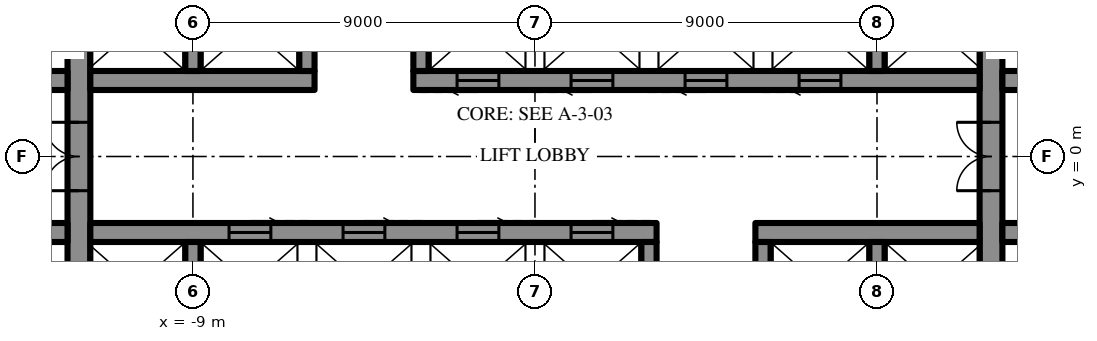
"""IFC4 building model, lengths in metres.
Left out: names, types, materials, properties, quantities, classifications, styles, units other than length and angle.
Written with IfcOpenShell. Run it as: python <this file> out.ifc"""

import sys

from ifc_helpers import new_model, si_unit, direction, frame, frame_2d, origin, place, context, subcontext, project, spatial, rectangle, extrude, element, fill, save


model = new_model("IFC4")
c1 = context("Model", 3, precision=1e-05, world=origin(), true_north=direction((0.0, 1.0)))
c2 = subcontext(c1, "Body", "Model", "MODEL_VIEW")
j1 = project(units=[si_unit("LENGTHUNIT", "METRE"), si_unit("PLANEANGLEUNIT", "RADIAN")], contexts=[c1])
p1 = place(None, origin())
s1 = spatial("IfcSite", under=j1, at=p1, CompositionType="ELEMENT")
p2 = place(p1, origin())
s2 = spatial("IfcBuilding", under=s1, at=p2, CompositionType="ELEMENT")
p3 = place(p2, frame((0.0, 0.0, 270.1)))
s3 = spatial("IfcBuildingStorey", under=s2, at=p3, CompositionType="ELEMENT", Elevation=270.1)
p4 = place(p3, frame((12.0, -10.7, 0.0), z_axis=(0.0, 0.0, 1.0), x_axis=(0.0, 1.0, 0.0)))
e1 = element("IfcWall", 1, at=p4, inside=s3, PredefinedType="SHEAR", context=c2, shape_type="SweptSolid", body=[
    extrude(rectangle(XDim=21.4, YDim=0.6, at=frame_2d((10.7, 0.0))), origin(), (0.0, 0.0, 1.0), 4.2),
])
p5 = place(p4, frame((9.8, 0.0, 0.0)))
e2 = element("IfcOpeningElement", 2, at=p5, cuts=e1, PredefinedType="OPENING", context=c2, shape_type="SweptSolid", body=[
    extrude(rectangle(XDim=1.8, YDim=2.4, at=frame_2d((0.9, 1.2))), frame((0.0, 0.31, 0.0), z_axis=(0.0, -1.0, 0.0), x_axis=(1.0, 0.0, 0.0)), (0.0, 0.0, 1.0), 0.62),
])
p6 = place(p3, frame((-12.0, -10.7, 0.0), z_axis=(0.0, 0.0, 1.0), x_axis=(0.0, 1.0, 0.0)))
e3 = element("IfcWall", 3, at=p6, inside=s3, PredefinedType="SHEAR", context=c2, shape_type="SweptSolid", body=[
    extrude(rectangle(XDim=21.4, YDim=0.6, at=frame_2d((10.7, 0.0))), origin(), (0.0, 0.0, 1.0), 4.2),
])
p7 = place(p6, frame((9.8, 0.0, 0.0)))
e4 = element("IfcOpeningElement", 4, at=p7, cuts=e3, PredefinedType="OPENING", context=c2, shape_type="SweptSolid", body=[
    extrude(rectangle(XDim=1.8, YDim=2.4, at=frame_2d((0.9, 1.2))), frame((0.0, 0.31, 0.0), z_axis=(0.0, -1.0, 0.0), x_axis=(1.0, 0.0, 0.0)), (0.0, 0.0, 1.0), 0.62),
])
p8 = place(p3, frame((-14.5, 2.0, 0.0), z_axis=(0.0, 0.0, 1.0), x_axis=(1.0, 0.0, 0.0)))
e5 = element("IfcWall", 5, at=p8, inside=s3, PredefinedType="SHEAR", context=c2, shape_type="SweptSolid", body=[
    extrude(rectangle(XDim=2.2, YDim=0.5, at=frame_2d((1.1, 0.0))), origin(), (0.0, 0.0, 1.0), 4.2),
])
p9 = place(p8, frame((0.5, 0.0, 0.0)))
e6 = element("IfcOpeningElement", 6, at=p9, cuts=e5, PredefinedType="OPENING", context=c2, shape_type="SweptSolid", body=[
    extrude(rectangle(XDim=0.9, YDim=2.2, at=frame_2d((0.45, 1.1))), frame((0.0, 0.26, 0.0), z_axis=(0.0, -1.0, 0.0), x_axis=(1.0, 0.0, 0.0)), (0.0, 0.0, 1.0), 0.52),
])
p10 = place(p3, frame((-11.7, 2.0, 0.0), z_axis=(0.0, 0.0, 1.0), x_axis=(1.0, 0.0, 0.0)))
e7 = element("IfcWall", 7, at=p10, inside=s3, PredefinedType="SHEAR", context=c2, shape_type="SweptSolid", body=[
    extrude(rectangle(XDim=5.9, YDim=0.5, at=frame_2d((2.95, 0.0))), origin(), (0.0, 0.0, 1.0), 4.2),
])
p11 = place(p3, frame((-3.2, 2.0, 0.0), z_axis=(0.0, 0.0, 1.0), x_axis=(1.0, 0.0, 0.0)))
e8 = element("IfcWall", 8, at=p11, inside=s3, PredefinedType="SHEAR", context=c2, shape_type="SweptSolid", body=[
    extrude(rectangle(XDim=14.9, YDim=0.5, at=frame_2d((7.45, 0.0))), origin(), (0.0, 0.0, 1.0), 4.2),
])
p12 = place(p11, frame((1.15, 0.0, 0.0)))
e9 = element("IfcOpeningElement", 9, at=p12, cuts=e8, PredefinedType="OPENING", context=c2, shape_type="SweptSolid", body=[
    extrude(rectangle(XDim=1.1, YDim=2.2, at=frame_2d((0.55, 1.1))), frame((0.0, 0.26, 0.0), z_axis=(0.0, -1.0, 0.0), x_axis=(1.0, 0.0, 0.0)), (0.0, 0.0, 1.0), 0.52),
])
p13 = place(p11, frame((4.15, 0.0, 0.0)))
e10 = element("IfcOpeningElement", 10, at=p13, cuts=e8, PredefinedType="OPENING", context=c2, shape_type="SweptSolid", body=[
    extrude(rectangle(XDim=1.1, YDim=2.2, at=frame_2d((0.55, 1.1))), frame((0.0, 0.26, 0.0), z_axis=(0.0, -1.0, 0.0), x_axis=(1.0, 0.0, 0.0)), (0.0, 0.0, 1.0), 0.52),
])
p14 = place(p11, frame((7.15, 0.0, 0.0)))
e11 = element("IfcOpeningElement", 11, at=p14, cuts=e8, PredefinedType="OPENING", context=c2, shape_type="SweptSolid", body=[
    extrude(rectangle(XDim=1.1, YDim=2.2, at=frame_2d((0.55, 1.1))), frame((0.0, 0.26, 0.0), z_axis=(0.0, -1.0, 0.0), x_axis=(1.0, 0.0, 0.0)), (0.0, 0.0, 1.0), 0.52),
])
p15 = place(p11, frame((10.15, 0.0, 0.0)))
e12 = element("IfcOpeningElement", 12, at=p15, cuts=e8, PredefinedType="OPENING", context=c2, shape_type="SweptSolid", body=[
    extrude(rectangle(XDim=1.1, YDim=2.2, at=frame_2d((0.55, 1.1))), frame((0.0, 0.26, 0.0), z_axis=(0.0, -1.0, 0.0), x_axis=(1.0, 0.0, 0.0)), (0.0, 0.0, 1.0), 0.52),
])
p16 = place(p3, frame((12.3, 2.0, 0.0), z_axis=(0.0, 0.0, 1.0), x_axis=(1.0, 0.0, 0.0)))
e13 = element("IfcWall", 13, at=p16, inside=s3, PredefinedType="SHEAR", context=c2, shape_type="SweptSolid", body=[
    extrude(rectangle(XDim=2.2, YDim=0.5, at=frame_2d((1.1, 0.0))), origin(), (0.0, 0.0, 1.0), 4.2),
])
p17 = place(p16, frame((0.8, 0.0, 0.0)))
e14 = element("IfcOpeningElement", 14, at=p17, cuts=e13, PredefinedType="OPENING", context=c2, shape_type="SweptSolid", body=[
    extrude(rectangle(XDim=0.9, YDim=2.2, at=frame_2d((0.45, 1.1))), frame((0.0, 0.26, 0.0), z_axis=(0.0, -1.0, 0.0), x_axis=(1.0, 0.0, 0.0)), (0.0, 0.0, 1.0), 0.52),
])
for number, where, z_axis, x_axis in (
    (15, (-9.0, 2.25, 0.0), (0.0, 0.0, 1.0), (0.0, 1.0, 0.0)),
    (16, (-6.0, 2.25, 0.0), (0.0, 0.0, 1.0), (0.0, 1.0, 0.0)),
    (17, (-3.0, 2.25, 0.0), (0.0, 0.0, 1.0), (0.0, 1.0, 0.0)),
    (18, (9.0, 2.25, 0.0), (0.0, 0.0, 1.0), (0.0, 1.0, 0.0)),
):
    element("IfcWall", number, at=place(p3, frame(where, z_axis=z_axis, x_axis=x_axis)), inside=s3, PredefinedType="SHEAR", context=c2, shape_type="SweptSolid", body=[
        extrude(rectangle(XDim=2.3, YDim=0.4, at=frame_2d((1.15, 0.0))), origin(), (0.0, 0.0, 1.0), 4.2),
    ])
p18 = place(p3, frame((14.5, -2.0, 0.0), z_axis=(0.0, 0.0, 1.0), x_axis=(-1.0, 0.0, 0.0)))
e19 = element("IfcWall", 19, at=p18, inside=s3, PredefinedType="SHEAR", context=c2, shape_type="SweptSolid", body=[
    extrude(rectangle(XDim=2.2, YDim=0.5, at=frame_2d((1.1, 0.0))), origin(), (0.0, 0.0, 1.0), 4.2),
])
p19 = place(p18, frame((0.5, 0.0, 0.0)))
e20 = element("IfcOpeningElement", 20, at=p19, cuts=e19, PredefinedType="OPENING", context=c2, shape_type="SweptSolid", body=[
    extrude(rectangle(XDim=0.9, YDim=2.2, at=frame_2d((0.45, 1.1))), frame((0.0, 0.26, 0.0), z_axis=(0.0, -1.0, 0.0), x_axis=(1.0, 0.0, 0.0)), (0.0, 0.0, 1.0), 0.52),
])
p20 = place(p3, frame((11.7, -2.0, 0.0), z_axis=(0.0, 0.0, 1.0), x_axis=(-1.0, 0.0, 0.0)))
e21 = element("IfcWall", 21, at=p20, inside=s3, PredefinedType="SHEAR", context=c2, shape_type="SweptSolid", body=[
    extrude(rectangle(XDim=5.9, YDim=0.5, at=frame_2d((2.95, 0.0))), origin(), (0.0, 0.0, 1.0), 4.2),
])
p21 = place(p3, frame((3.2, -2.0, 0.0), z_axis=(0.0, 0.0, 1.0), x_axis=(-1.0, 0.0, 0.0)))
e22 = element("IfcWall", 22, at=p21, inside=s3, PredefinedType="SHEAR", context=c2, shape_type="SweptSolid", body=[
    extrude(rectangle(XDim=14.9, YDim=0.5, at=frame_2d((7.45, 0.0))), origin(), (0.0, 0.0, 1.0), 4.2),
])
p22 = place(p21, frame((1.15, 0.0, 0.0)))
e23 = element("IfcOpeningElement", 23, at=p22, cuts=e22, PredefinedType="OPENING", context=c2, shape_type="SweptSolid", body=[
    extrude(rectangle(XDim=1.1, YDim=2.2, at=frame_2d((0.55, 1.1))), frame((0.0, 0.26, 0.0), z_axis=(0.0, -1.0, 0.0), x_axis=(1.0, 0.0, 0.0)), (0.0, 0.0, 1.0), 0.52),
])
p23 = place(p21, frame((4.15, 0.0, 0.0)))
e24 = element("IfcOpeningElement", 24, at=p23, cuts=e22, PredefinedType="OPENING", context=c2, shape_type="SweptSolid", body=[
    extrude(rectangle(XDim=1.1, YDim=2.2, at=frame_2d((0.55, 1.1))), frame((0.0, 0.26, 0.0), z_axis=(0.0, -1.0, 0.0), x_axis=(1.0, 0.0, 0.0)), (0.0, 0.0, 1.0), 0.52),
])
p24 = place(p21, frame((7.15, 0.0, 0.0)))
e25 = element("IfcOpeningElement", 25, at=p24, cuts=e22, PredefinedType="OPENING", context=c2, shape_type="SweptSolid", body=[
    extrude(rectangle(XDim=1.1, YDim=2.2, at=frame_2d((0.55, 1.1))), frame((0.0, 0.26, 0.0), z_axis=(0.0, -1.0, 0.0), x_axis=(1.0, 0.0, 0.0)), (0.0, 0.0, 1.0), 0.52),
])
p25 = place(p21, frame((10.15, 0.0, 0.0)))
e26 = element("IfcOpeningElement", 26, at=p25, cuts=e22, PredefinedType="OPENING", context=c2, shape_type="SweptSolid", body=[
    extrude(rectangle(XDim=1.1, YDim=2.2, at=frame_2d((0.55, 1.1))), frame((0.0, 0.26, 0.0), z_axis=(0.0, -1.0, 0.0), x_axis=(1.0, 0.0, 0.0)), (0.0, 0.0, 1.0), 0.52),
])
p26 = place(p3, frame((-12.3, -2.0, 0.0), z_axis=(0.0, 0.0, 1.0), x_axis=(-1.0, 0.0, 0.0)))
e27 = element("IfcWall", 27, at=p26, inside=s3, PredefinedType="SHEAR", context=c2, shape_type="SweptSolid", body=[
    extrude(rectangle(XDim=2.2, YDim=0.5, at=frame_2d((1.1, 0.0))), origin(), (0.0, 0.0, 1.0), 4.2),
])
p27 = place(p26, frame((0.8, 0.0, 0.0)))
e28 = element("IfcOpeningElement", 28, at=p27, cuts=e27, PredefinedType="OPENING", context=c2, shape_type="SweptSolid", body=[
    extrude(rectangle(XDim=0.9, YDim=2.2, at=frame_2d((0.45, 1.1))), frame((0.0, 0.26, 0.0), z_axis=(0.0, -1.0, 0.0), x_axis=(1.0, 0.0, 0.0)), (0.0, 0.0, 1.0), 0.52),
])
for number, where, z_axis, x_axis in (
    (29, (9.0, -2.25, 0.0), (0.0, 0.0, 1.0), (0.0, -1.0, 0.0)),
    (30, (6.0, -2.25, 0.0), (0.0, 0.0, 1.0), (0.0, -1.0, 0.0)),
    (31, (3.0, -2.25, 0.0), (0.0, 0.0, 1.0), (0.0, -1.0, 0.0)),
    (32, (-9.0, -2.25, 0.0), (0.0, 0.0, 1.0), (0.0, -1.0, 0.0)),
):
    element("IfcWall", number, at=place(p3, frame(where, z_axis=z_axis, x_axis=x_axis)), inside=s3, PredefinedType="SHEAR", context=c2, shape_type="SweptSolid", body=[
        extrude(rectangle(XDim=2.3, YDim=0.4, at=frame_2d((1.15, 0.0))), origin(), (0.0, 0.0, 1.0), 4.2),
    ])
p28 = place(p5, origin())
e33 = element("IfcDoor", 33, at=p28, inside=s3, OperationType="DOUBLE_DOOR_SINGLE_SWING", PredefinedType="DOOR", context=c2, shape_type="SweptSolid", body=[
    extrude(rectangle(XDim=1.8, YDim=2.4, at=frame_2d((0.9, 1.2))), frame((0.0, 0.025, 0.0), z_axis=(0.0, -1.0, 0.0), x_axis=(1.0, 0.0, 0.0)), (0.0, 0.0, 1.0), 0.05),
])
fill(e2, e33)
p29 = place(p7, origin())
e34 = element("IfcDoor", 34, at=p29, inside=s3, OperationType="DOUBLE_DOOR_SINGLE_SWING", PredefinedType="DOOR", context=c2, shape_type="SweptSolid", body=[
    extrude(rectangle(XDim=1.8, YDim=2.4, at=frame_2d((0.9, 1.2))), frame((0.0, 0.025, 0.0), z_axis=(0.0, -1.0, 0.0), x_axis=(1.0, 0.0, 0.0)), (0.0, 0.0, 1.0), 0.05),
])
fill(e4, e34)
p30 = place(p12, frame((1.1, 0.0, 0.0), z_axis=(0.0, 0.0, 1.0), x_axis=(-1.0, 0.0, 0.0)))
e35 = element("IfcDoor", 35, at=p30, inside=s3, OperationType="SLIDING_TO_LEFT", PredefinedType="DOOR", context=c2, shape_type="SweptSolid", body=[
    extrude(rectangle(XDim=1.1, YDim=2.2, at=frame_2d((0.55, 1.1))), frame((0.0, 0.025, 0.0), z_axis=(0.0, -1.0, 0.0), x_axis=(1.0, 0.0, 0.0)), (0.0, 0.0, 1.0), 0.05),
])
fill(e9, e35)
p31 = place(p13, frame((1.1, 0.0, 0.0), z_axis=(0.0, 0.0, 1.0), x_axis=(-1.0, 0.0, 0.0)))
e36 = element("IfcDoor", 36, at=p31, inside=s3, OperationType="SLIDING_TO_LEFT", PredefinedType="DOOR", context=c2, shape_type="SweptSolid", body=[
    extrude(rectangle(XDim=1.1, YDim=2.2, at=frame_2d((0.55, 1.1))), frame((0.0, 0.025, 0.0), z_axis=(0.0, -1.0, 0.0), x_axis=(1.0, 0.0, 0.0)), (0.0, 0.0, 1.0), 0.05),
])
fill(e10, e36)
p32 = place(p14, frame((1.1, 0.0, 0.0), z_axis=(0.0, 0.0, 1.0), x_axis=(-1.0, 0.0, 0.0)))
e37 = element("IfcDoor", 37, at=p32, inside=s3, OperationType="SLIDING_TO_LEFT", PredefinedType="DOOR", context=c2, shape_type="SweptSolid", body=[
    extrude(rectangle(XDim=1.1, YDim=2.2, at=frame_2d((0.55, 1.1))), frame((0.0, 0.025, 0.0), z_axis=(0.0, -1.0, 0.0), x_axis=(1.0, 0.0, 0.0)), (0.0, 0.0, 1.0), 0.05),
])
fill(e11, e37)
p33 = place(p15, frame((1.1, 0.0, 0.0), z_axis=(0.0, 0.0, 1.0), x_axis=(-1.0, 0.0, 0.0)))
e38 = element("IfcDoor", 38, at=p33, inside=s3, OperationType="SLIDING_TO_LEFT", PredefinedType="DOOR", context=c2, shape_type="SweptSolid", body=[
    extrude(rectangle(XDim=1.1, YDim=2.2, at=frame_2d((0.55, 1.1))), frame((0.0, 0.025, 0.0), z_axis=(0.0, -1.0, 0.0), x_axis=(1.0, 0.0, 0.0)), (0.0, 0.0, 1.0), 0.05),
])
fill(e12, e38)
p34 = place(p22, frame((1.1, 0.0, 0.0), z_axis=(0.0, 0.0, 1.0), x_axis=(-1.0, 0.0, 0.0)))
e39 = element("IfcDoor", 39, at=p34, inside=s3, OperationType="SLIDING_TO_LEFT", PredefinedType="DOOR", context=c2, shape_type="SweptSolid", body=[
    extrude(rectangle(XDim=1.1, YDim=2.2, at=frame_2d((0.55, 1.1))), frame((0.0, 0.025, 0.0), z_axis=(0.0, -1.0, 0.0), x_axis=(1.0, 0.0, 0.0)), (0.0, 0.0, 1.0), 0.05),
])
fill(e23, e39)
p35 = place(p23, frame((1.1, 0.0, 0.0), z_axis=(0.0, 0.0, 1.0), x_axis=(-1.0, 0.0, 0.0)))
e40 = element("IfcDoor", 40, at=p35, inside=s3, OperationType="SLIDING_TO_LEFT", PredefinedType="DOOR", context=c2, shape_type="SweptSolid", body=[
    extrude(rectangle(XDim=1.1, YDim=2.2, at=frame_2d((0.55, 1.1))), frame((0.0, 0.025, 0.0), z_axis=(0.0, -1.0, 0.0), x_axis=(1.0, 0.0, 0.0)), (0.0, 0.0, 1.0), 0.05),
])
fill(e24, e40)
p36 = place(p24, frame((1.1, 0.0, 0.0), z_axis=(0.0, 0.0, 1.0), x_axis=(-1.0, 0.0, 0.0)))
e41 = element("IfcDoor", 41, at=p36, inside=s3, OperationType="SLIDING_TO_LEFT", PredefinedType="DOOR", context=c2, shape_type="SweptSolid", body=[
    extrude(rectangle(XDim=1.1, YDim=2.2, at=frame_2d((0.55, 1.1))), frame((0.0, 0.025, 0.0), z_axis=(0.0, -1.0, 0.0), x_axis=(1.0, 0.0, 0.0)), (0.0, 0.0, 1.0), 0.05),
])
fill(e25, e41)
p37 = place(p25, frame((1.1, 0.0, 0.0), z_axis=(0.0, 0.0, 1.0), x_axis=(-1.0, 0.0, 0.0)))
e42 = element("IfcDoor", 42, at=p37, inside=s3, OperationType="SLIDING_TO_LEFT", PredefinedType="DOOR", context=c2, shape_type="SweptSolid", body=[
    extrude(rectangle(XDim=1.1, YDim=2.2, at=frame_2d((0.55, 1.1))), frame((0.0, 0.025, 0.0), z_axis=(0.0, -1.0, 0.0), x_axis=(1.0, 0.0, 0.0)), (0.0, 0.0, 1.0), 0.05),
])
fill(e26, e42)
save(model, sys.argv[1])
